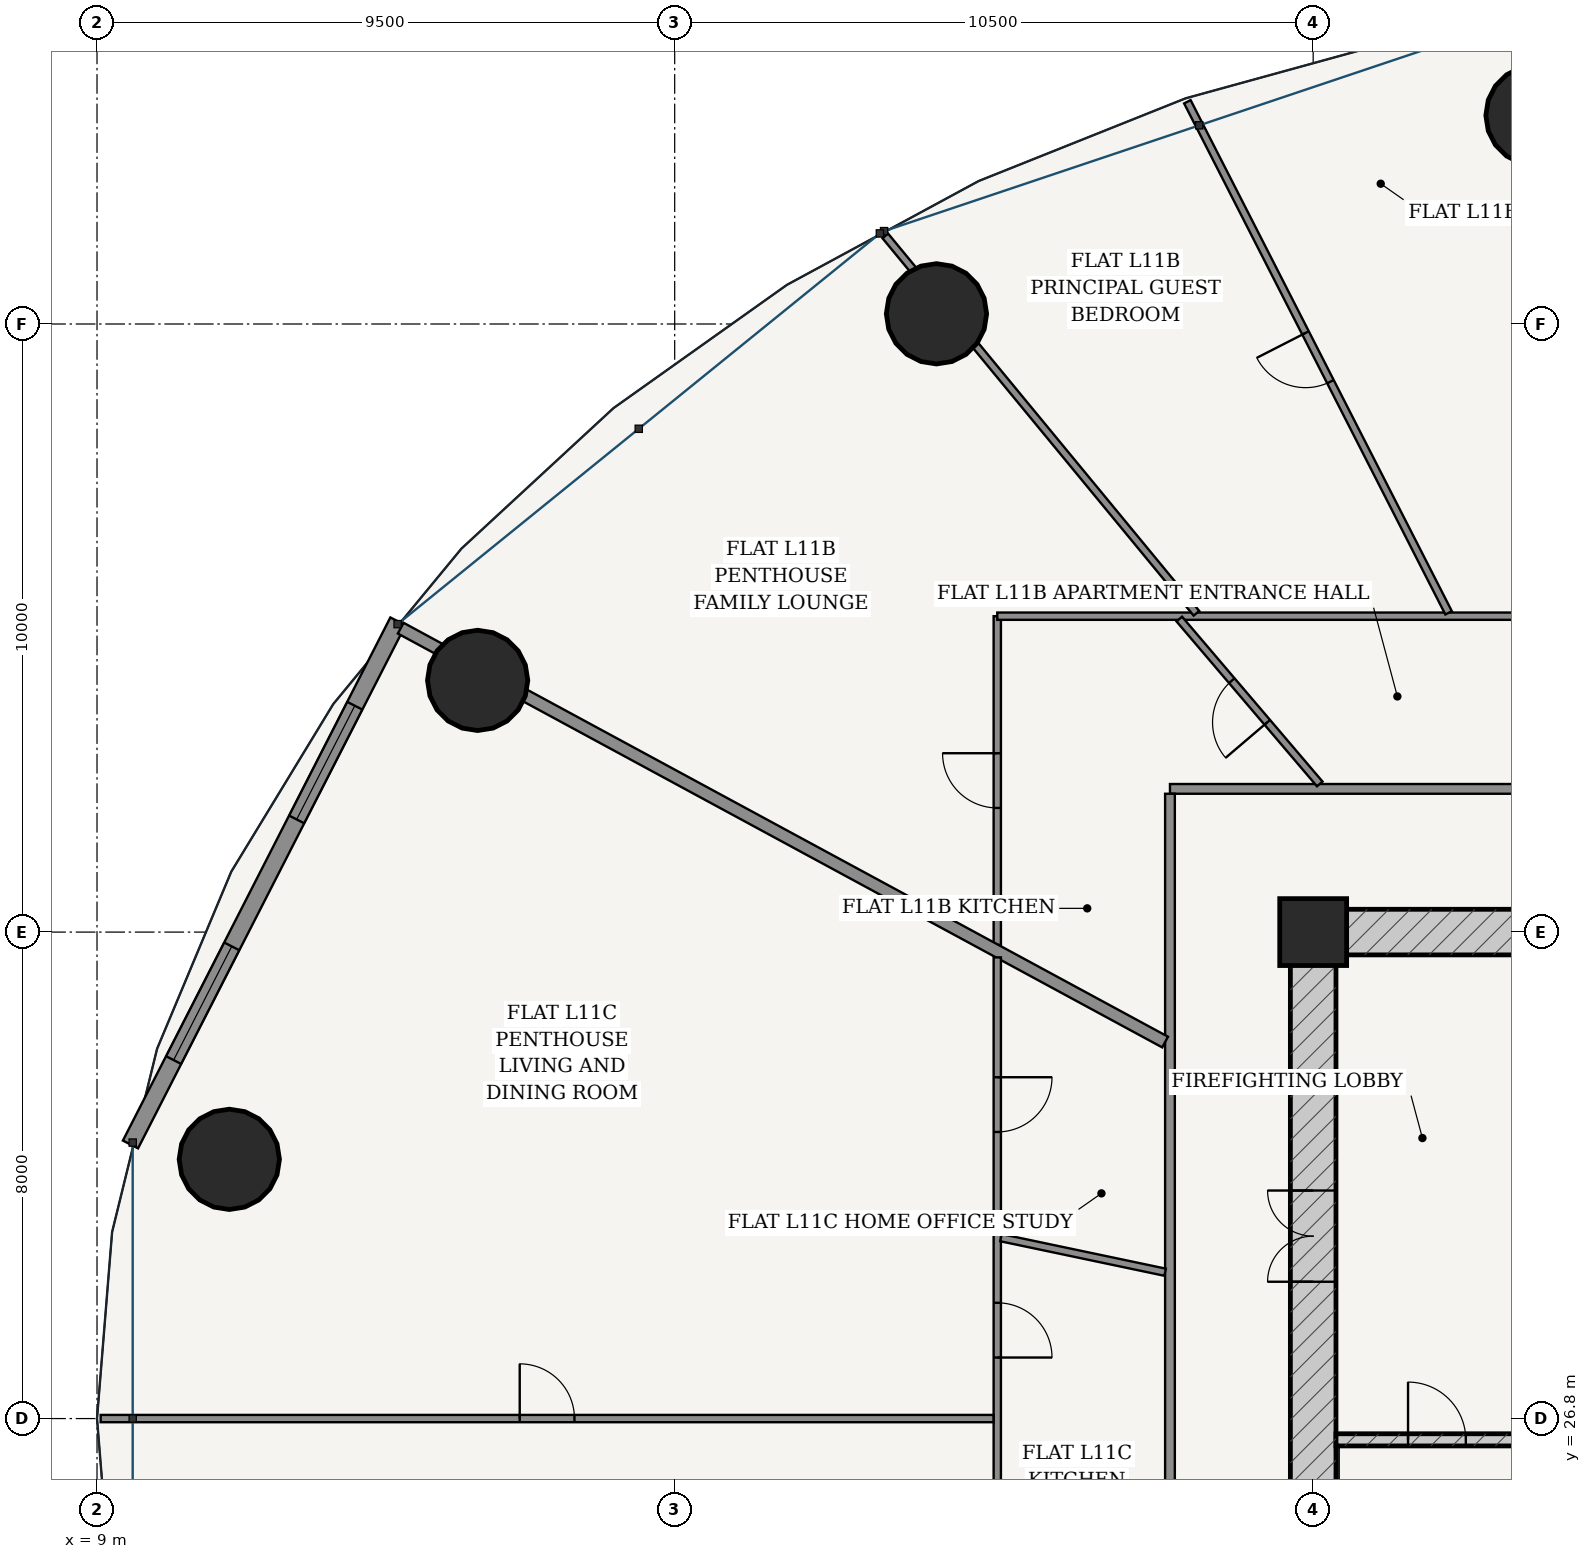
"""IFC4 building model, lengths in metres.
Left out: names, types, materials, properties, quantities, classifications, styles, units other than length and angle.
Written with IfcOpenShell. Run it as: python <this file> out.ifc"""

import sys

from ifc_helpers import new_model, si_unit, direction, frame, frame_2d, origin, origin_2d, place, context, subcontext, project, spatial, rectangle, hollow_circle, extrude, source, transform, mapped, element, fill, save


model = new_model("IFC4")
c1 = context("Model", 3, precision=1e-05, world=origin(), true_north=direction((-0.2419218956, 0.970295726276)))
c2 = subcontext(c1, "Body", "Model", "MODEL_VIEW")
j1 = project(units=[si_unit("LENGTHUNIT", "METRE"), si_unit("PLANEANGLEUNIT", "RADIAN")], contexts=[c1])
p1 = place(None, origin())
s1 = spatial("IfcSite", under=j1, at=p1, CompositionType="ELEMENT")
p2 = place(p1, origin())
s2 = spatial("IfcBuilding", under=s1, at=p2, CompositionType="ELEMENT")
p3 = place(p2, frame((0.0, 0.0, 45.6)))
s3 = spatial("IfcBuildingStorey", under=s2, at=p3, CompositionType="ELEMENT", Elevation=45.6)
p4 = place(p3, frame((29.0, 34.8, 0.0), z_axis=(0.0, 0.0, 1.0), x_axis=(1.0, 0.0, 0.0)))
e1 = element("IfcColumn", 1, at=p4, inside=s3, PredefinedType="COLUMN", context=c2, shape_type="SweptSolid", body=[
    extrude(rectangle(XDim=1.1, YDim=1.1, at=origin_2d()), origin(), (0.0, 0.0, 1.0), 3.6),
])
p5 = place(p3, frame((28.625, 34.8, 0.0), z_axis=(0.0, 0.0, 1.0), x_axis=(1.0, 0.0, 0.0)))
e2 = element("IfcWall", 2, at=p5, inside=s3, PredefinedType="SHEAR", context=c2, shape_type="SweptSolid", body=[
    extrude(rectangle(XDim=18.75, YDim=0.75, at=frame_2d((9.375, 0.0))), origin(), (0.0, 0.0, 1.0), 3.32),
])
p6 = place(p5, frame((6.887, 0.0, 0.0)))
e3 = element("IfcOpeningElement", 3, at=p6, cuts=e2, PredefinedType="OPENING", context=c2, shape_type="SweptSolid", body=[
    extrude(rectangle(XDim=0.85, YDim=2.1, at=frame_2d((0.425, 1.05))), frame((0.0, 0.385, 0.0), z_axis=(0.0, -1.0, 0.0), x_axis=(1.0, 0.0, 0.0)), (0.0, 0.0, 1.0), 0.77),
])
p7 = place(p5, frame((8.945, 0.0, 0.0)))
e4 = element("IfcOpeningElement", 4, at=p7, cuts=e2, PredefinedType="OPENING", context=c2, shape_type="SweptSolid", body=[
    extrude(rectangle(XDim=0.86, YDim=2.1, at=frame_2d((0.43, 1.05))), frame((0.0, 0.385, 0.0), z_axis=(0.0, -1.0, 0.0), x_axis=(1.0, 0.0, 0.0)), (0.0, 0.0, 1.0), 0.77),
])
p8 = place(p5, frame((11.012, 0.0, 0.0)))
e5 = element("IfcOpeningElement", 5, at=p8, cuts=e2, PredefinedType="OPENING", context=c2, shape_type="SweptSolid", body=[
    extrude(rectangle(XDim=0.85, YDim=2.1, at=frame_2d((0.425, 1.05))), frame((0.0, 0.385, 0.0), z_axis=(0.0, -1.0, 0.0), x_axis=(1.0, 0.0, 0.0)), (0.0, 0.0, 1.0), 0.77),
])
p9 = place(p3, frame((29.0, 19.175, 0.0), z_axis=(0.0, 0.0, 1.0), x_axis=(0.0, 1.0, 0.0)))
e6 = element("IfcWall", 6, at=p9, inside=s3, PredefinedType="SHEAR", context=c2, shape_type="SweptSolid", body=[
    extrude(rectangle(XDim=15.25, YDim=0.75, at=frame_2d((7.625, 0.0))), origin(), (0.0, 0.0, 1.0), 3.32),
])
p10 = place(p9, frame((9.875, 0.0, 0.0)))
e7 = element("IfcOpeningElement", 7, at=p10, cuts=e6, PredefinedType="OPENING", context=c2, shape_type="SweptSolid", body=[
    extrude(rectangle(XDim=1.5, YDim=2.2, at=frame_2d((0.75, 1.1))), frame((0.0, 0.385, 0.0), z_axis=(0.0, -1.0, 0.0), x_axis=(1.0, 0.0, 0.0)), (0.0, 0.0, 1.0), 0.77),
])
p11 = place(p3, frame((29.375, 26.45, 0.0), z_axis=(0.0, 0.0, 1.0), x_axis=(1.0, 0.0, 0.0)))
e8 = element("IfcWall", 8, at=p11, inside=s3, PredefinedType="SOLIDWALL", context=c2, shape_type="SweptSolid", body=[
    extrude(rectangle(XDim=3.32, YDim=0.2, at=frame_2d((1.66, 0.0))), origin(), (0.0, 0.0, 1.0), 3.32),
])
p12 = place(p11, frame((1.185, 0.0, 0.0)))
e9 = element("IfcOpeningElement", 9, at=p12, cuts=e8, PredefinedType="OPENING", context=c2, shape_type="SweptSolid", body=[
    extrude(rectangle(XDim=0.95, YDim=2.15, at=frame_2d((0.475, 1.075))), frame((0.0, 0.11, 0.0), z_axis=(0.0, -1.0, 0.0), x_axis=(1.0, 0.0, 0.0)), (0.0, 0.0, 1.0), 0.22),
])
for number, where, z_axis, x_axis in (
    (10, (32.664, 48.23, 0.0), (0.0, 0.0, 1.0), (1.0, 0.0, 0.0)),
    (11, (22.805, 44.968, 0.0), (0.0, 0.0, 1.0), (1.0, 0.0, 0.0)),
    (12, (15.259, 38.939, 0.0), (0.0, 0.0, 1.0), (1.0, 0.0, 0.0)),
    (13, (11.176, 31.063, 0.0), (0.0, 0.0, 1.0), (1.0, 0.0, 0.0)),
):
    element("IfcColumn", number, at=place(p3, frame(where, z_axis=z_axis, x_axis=x_axis)), inside=s3, PredefinedType="COLUMN", context=c2, shape_type="SweptSolid", body=[
        extrude(hollow_circle(Radius=0.825, WallThickness=0.05, at=origin_2d()), origin(), (0.0, 0.0, 1.0), 3.6),
    ])
p13 = place(p3, frame((13.949, 39.91, 0.0), z_axis=(0.0, 0.0, 1.0), x_axis=(-0.45523081716, -0.890373462715, 0.0)))
e14 = element("IfcWall", 14, at=p13, inside=s3, PredefinedType="SOLIDWALL", context=c2, shape_type="SweptSolid", body=[
    extrude(rectangle(XDim=9.662, YDim=0.28, at=frame_2d((4.831, 0.0))), origin(), (0.0, 0.0, 1.0), 3.32),
])
p14 = place(p13, frame((1.559, 0.0, 0.85)))
e15 = element("IfcOpeningElement", 15, at=p14, cuts=e14, PredefinedType="OPENING", context=c2, shape_type="SweptSolid", body=[
    extrude(rectangle(XDim=2.1, YDim=1.95, at=frame_2d((1.05, 0.975))), frame((0.0, 0.15, 0.0), z_axis=(0.0, -1.0, 0.0), x_axis=(1.0, 0.0, 0.0)), (0.0, 0.0, 1.0), 0.3),
])
p15 = place(p13, frame((6.003, 0.0, 0.85)))
e16 = element("IfcOpeningElement", 16, at=p15, cuts=e14, PredefinedType="OPENING", context=c2, shape_type="SweptSolid", body=[
    extrude(rectangle(XDim=2.1, YDim=1.95, at=frame_2d((1.05, 0.975))), frame((0.0, 0.15, 0.0), z_axis=(0.0, -1.0, 0.0), x_axis=(1.0, 0.0, 0.0)), (0.0, 0.0, 1.0), 0.3),
])
p16 = place(p3, frame((26.645, 37.155, 0.0), z_axis=(0.0, 0.0, 1.0), x_axis=(1.0, 0.0, 0.0)))
e17 = element("IfcWall", 17, at=p16, inside=s3, PredefinedType="PARTITIONING", context=c2, shape_type="SweptSolid", body=[
    extrude(rectangle(XDim=22.71, YDim=0.16, at=frame_2d((11.355, 0.0))), origin(), (0.0, 0.0, 1.0), 2.688),
])
p17 = place(p16, frame((19.075, 0.0, 0.0)))
e18 = element("IfcOpeningElement", 18, at=p17, cuts=e17, PredefinedType="OPENING", context=c2, shape_type="SweptSolid", body=[
    extrude(rectangle(XDim=0.98, YDim=2.2, at=frame_2d((0.49, 1.1))), frame((0.0, 0.09, 0.0), z_axis=(0.0, -1.0, 0.0), x_axis=(1.0, 0.0, 0.0)), (0.0, 0.0, 1.0), 0.18),
])
p18 = place(p16, frame((6.221, 0.0, 0.0)))
e19 = element("IfcOpeningElement", 19, at=p18, cuts=e17, PredefinedType="OPENING", context=c2, shape_type="SweptSolid", body=[
    extrude(rectangle(XDim=0.98, YDim=2.2, at=frame_2d((0.49, 1.1))), frame((0.0, 0.09, 0.0), z_axis=(0.0, -1.0, 0.0), x_axis=(1.0, 0.0, 0.0)), (0.0, 0.0, 1.0), 0.18),
])
p19 = place(p3, frame((26.645, 16.525, 0.0), z_axis=(0.0, 0.0, 1.0), x_axis=(0.0, 1.0, 0.0)))
e20 = element("IfcWall", 20, at=p19, inside=s3, PredefinedType="PARTITIONING", context=c2, shape_type="SweptSolid", body=[
    extrude(rectangle(XDim=20.55, YDim=0.16, at=frame_2d((10.275, 0.0))), origin(), (0.0, 0.0, 1.0), 2.688),
])
p20 = place(p19, frame((2.224, 0.0, 0.0)))
e21 = element("IfcOpeningElement", 21, at=p20, cuts=e20, PredefinedType="OPENING", context=c2, shape_type="SweptSolid", body=[
    extrude(rectangle(XDim=0.98, YDim=2.2, at=frame_2d((0.49, 1.1))), frame((0.0, 0.09, 0.0), z_axis=(0.0, -1.0, 0.0), x_axis=(1.0, 0.0, 0.0)), (0.0, 0.0, 1.0), 0.18),
])
p21 = place(p3, frame((23.805, 34.588, 0.0), z_axis=(0.0, 0.0, 1.0), x_axis=(0.0, 1.0, 0.0)))
e22 = element("IfcWall", 22, at=p21, inside=s3, PredefinedType="PARTITIONING", context=c2, shape_type="SweptSolid", body=[
    extrude(rectangle(XDim=5.407, YDim=0.12, at=frame_2d((2.704, 0.0))), origin(), (0.0, 0.0, 1.0), 2.999),
])
p22 = place(p21, frame((2.253, 0.0, 0.0)))
e23 = element("IfcOpeningElement", 23, at=p22, cuts=e22, PredefinedType="OPENING", context=c2, shape_type="SweptSolid", body=[
    extrude(rectangle(XDim=0.9, YDim=2.15, at=frame_2d((0.45, 1.075))), frame((0.0, 0.07, 0.0), z_axis=(0.0, -1.0, 0.0), x_axis=(1.0, 0.0, 0.0)), (0.0, 0.0, 1.0), 0.14),
])
p23 = place(p3, frame((23.805, 39.995, 0.0), z_axis=(0.0, 0.0, 1.0), x_axis=(1.0, 0.0, 0.0)))
e24 = element("IfcWall", 24, at=p23, inside=s3, PredefinedType="PARTITIONING", context=c2, shape_type="SweptSolid", body=[
    extrude(rectangle(XDim=20.838, YDim=0.12, at=frame_2d((10.419, 0.0))), origin(), (0.0, 0.0, 1.0), 2.688),
])
p24 = place(p23, frame((11.931, 0.0, 0.0)))
e25 = element("IfcOpeningElement", 25, at=p24, cuts=e24, PredefinedType="OPENING", context=c2, shape_type="SweptSolid", body=[
    extrude(rectangle(XDim=0.9, YDim=2.15, at=frame_2d((0.45, 1.075))), frame((0.0, 0.07, 0.0), z_axis=(0.0, -1.0, 0.0), x_axis=(1.0, 0.0, 0.0)), (0.0, 0.0, 1.0), 0.14),
])
p25 = place(p3, frame((31.227, 40.05, 0.0), z_axis=(0.0, 0.0, 1.0), x_axis=(-0.455142050367, 0.890418841887, 0.0)))
e26 = element("IfcWall", 26, at=p25, inside=s3, PredefinedType="PARTITIONING", context=c2, shape_type="SweptSolid", body=[
    extrude(rectangle(XDim=9.438, YDim=0.12, at=frame_2d((4.719, 0.0))), origin(), (0.0, 0.0, 1.0), 2.762),
])
p26 = place(p25, frame((4.269, 0.0, 0.0)))
e27 = element("IfcOpeningElement", 27, at=p26, cuts=e26, PredefinedType="OPENING", context=c2, shape_type="SweptSolid", body=[
    extrude(rectangle(XDim=0.9, YDim=2.15, at=frame_2d((0.45, 1.075))), frame((0.0, 0.07, 0.0), z_axis=(0.0, -1.0, 0.0), x_axis=(1.0, 0.0, 0.0)), (0.0, 0.0, 1.0), 0.14),
])
p27 = place(p3, frame((27.081, 40.043, 0.0), z_axis=(0.0, 0.0, 1.0), x_axis=(-0.636193310573, 0.771529695852, 0.0)))
e28 = element("IfcWall", 28, at=p27, inside=s3, PredefinedType="PARTITIONING", context=c2, shape_type="SweptSolid", body=[
    extrude(rectangle(XDim=8.044, YDim=0.12, at=frame_2d((4.022, 0.0))), origin(), (0.0, 0.0, 1.0), 2.688),
])
p28 = place(p3, frame((29.108, 37.237, 0.0), z_axis=(0.0, 0.0, 1.0), x_axis=(-0.648553247009, 0.761169288526, 0.0)))
e29 = element("IfcWall", 29, at=p28, inside=s3, PredefinedType="PARTITIONING", context=c2, shape_type="SweptSolid", body=[
    extrude(rectangle(XDim=3.562, YDim=0.12, at=frame_2d((1.781, 0.0))), origin(), (0.0, 0.0, 1.0), 2.999),
])
p29 = place(p28, frame((1.331, 0.0, 0.0)))
e30 = element("IfcOpeningElement", 30, at=p29, cuts=e29, PredefinedType="OPENING", context=c2, shape_type="SweptSolid", body=[
    extrude(rectangle(XDim=0.9, YDim=2.15, at=frame_2d((0.45, 1.075))), frame((0.0, 0.07, 0.0), z_axis=(0.0, -1.0, 0.0), x_axis=(1.0, 0.0, 0.0)), (0.0, 0.0, 1.0), 0.14),
])
p30 = place(p3, frame((26.565, 32.991, 0.0), z_axis=(0.0, 0.0, 1.0), x_axis=(-0.879369737803, 0.476139542819, 0.0)))
e31 = element("IfcWall", 31, at=p30, inside=s3, PredefinedType="PARTITIONING", context=c2, shape_type="SweptSolid", body=[
    extrude(rectangle(XDim=14.295, YDim=0.2, at=frame_2d((7.147, 0.0))), origin(), (0.0, 0.0, 1.0), 2.688),
])
p31 = place(p3, frame((23.805, 13.605, 0.0), z_axis=(0.0, 0.0, 1.0), x_axis=(0.0, 1.0, 0.0)))
e32 = element("IfcWall", 32, at=p31, inside=s3, PredefinedType="PARTITIONING", context=c2, shape_type="SweptSolid", body=[
    extrude(rectangle(XDim=20.779, YDim=0.12, at=frame_2d((10.39, 0.0))), origin(), (0.0, 0.0, 1.0), 2.688),
])
p32 = place(p31, frame((2.425, 0.0, 0.0)))
e33 = element("IfcOpeningElement", 33, at=p32, cuts=e32, PredefinedType="OPENING", context=c2, shape_type="SweptSolid", body=[
    extrude(rectangle(XDim=0.9, YDim=2.15, at=frame_2d((0.45, 1.075))), frame((0.0, 0.07, 0.0), z_axis=(0.0, -1.0, 0.0), x_axis=(1.0, 0.0, 0.0)), (0.0, 0.0, 1.0), 0.14),
])
p33 = place(p31, frame((14.199, 0.0, 0.0)))
e34 = element("IfcOpeningElement", 34, at=p33, cuts=e32, PredefinedType="OPENING", context=c2, shape_type="SweptSolid", body=[
    extrude(rectangle(XDim=0.9, YDim=2.15, at=frame_2d((0.45, 1.075))), frame((0.0, 0.07, 0.0), z_axis=(0.0, -1.0, 0.0), x_axis=(1.0, 0.0, 0.0)), (0.0, 0.0, 1.0), 0.14),
])
p34 = place(p31, frame((17.908, 0.0, 0.0)))
e35 = element("IfcOpeningElement", 35, at=p34, cuts=e32, PredefinedType="OPENING", context=c2, shape_type="SweptSolid", body=[
    extrude(rectangle(XDim=0.9, YDim=2.15, at=frame_2d((0.45, 1.075))), frame((0.0, 0.07, 0.0), z_axis=(0.0, -1.0, 0.0), x_axis=(1.0, 0.0, 0.0)), (0.0, 0.0, 1.0), 0.14),
])
p35 = place(p3, frame((23.743, 26.8, 0.0), z_axis=(0.0, 0.0, 1.0), x_axis=(-1.0, 0.0, 0.0)))
e36 = element("IfcWall", 36, at=p35, inside=s3, PredefinedType="PARTITIONING", context=c2, shape_type="SweptSolid", body=[
    extrude(rectangle(XDim=14.683, YDim=0.12, at=frame_2d((7.341, 0.0))), origin(), (0.0, 0.0, 1.0), 2.762),
])
p36 = place(p35, frame((6.892, 0.0, 0.0)))
e37 = element("IfcOpeningElement", 37, at=p36, cuts=e36, PredefinedType="OPENING", context=c2, shape_type="SweptSolid", body=[
    extrude(rectangle(XDim=0.9, YDim=2.15, at=frame_2d((0.45, 1.075))), frame((0.0, 0.07, 0.0), z_axis=(0.0, -1.0, 0.0), x_axis=(1.0, 0.0, 0.0)), (0.0, 0.0, 1.0), 0.14),
])
p37 = place(p3, frame((26.565, 29.207, 0.0), z_axis=(0.0, 0.0, 1.0), x_axis=(-0.978560113768, 0.205961413236, 0.0)))
e38 = element("IfcWall", 38, at=p37, inside=s3, PredefinedType="PARTITIONING", context=c2, shape_type="SweptSolid", body=[
    extrude(rectangle(XDim=2.758, YDim=0.12, at=frame_2d((1.379, 0.0))), origin(), (0.0, 0.0, 1.0), 3.32),
])
m1 = source(origin(), c2, "Body", "SweptSolid", [
    extrude(rectangle(XDim=2.1, YDim=1.95, at=frame_2d((1.05, 0.975))), frame((0.0, 0.03, 0.0), z_axis=(0.0, -1.0, 0.0), x_axis=(1.0, 0.0, 0.0)), (0.0, 0.0, 1.0), 0.06),
])
p38 = place(p14, origin())
e39 = element("IfcWindow", 39, at=p38, inside=s3, PartitioningType="SINGLE_PANEL", PredefinedType="WINDOW", context=c2, shape_type="MappedRepresentation", body=[
    mapped(m1, transform((0.0, 0.0, 0.0), scale=1.0)),
])
fill(e15, e39)
p39 = place(p15, origin())
e40 = element("IfcWindow", 40, at=p39, inside=s3, PartitioningType="SINGLE_PANEL", PredefinedType="WINDOW", context=c2, shape_type="MappedRepresentation", body=[
    mapped(m1, transform((0.0, 0.0, 0.0), scale=1.0)),
])
fill(e16, e40)
m2 = source(origin(), c2, "Body", "SweptSolid", [
    extrude(rectangle(XDim=1.5, YDim=2.2, at=frame_2d((0.75, 1.1))), frame((0.0, 0.025, 0.0), z_axis=(0.0, -1.0, 0.0), x_axis=(1.0, 0.0, 0.0)), (0.0, 0.0, 1.0), 0.05),
])
p40 = place(p10, origin())
e41 = element("IfcDoor", 41, at=p40, inside=s3, OperationType="DOUBLE_DOOR_SINGLE_SWING", PredefinedType="DOOR", context=c2, shape_type="MappedRepresentation", body=[
    mapped(m2, transform((0.0, 0.0, 0.0), scale=1.0)),
])
fill(e7, e41)
m3 = source(origin(), c2, "Body", "SweptSolid", [
    extrude(rectangle(XDim=0.95, YDim=2.15, at=frame_2d((0.475, 1.075))), frame((0.0, 0.025, 0.0), z_axis=(0.0, -1.0, 0.0), x_axis=(1.0, 0.0, 0.0)), (0.0, 0.0, 1.0), 0.05),
])
p41 = place(p12, origin())
e42 = element("IfcDoor", 42, at=p41, inside=s3, OperationType="SINGLE_SWING_LEFT", PredefinedType="DOOR", context=c2, shape_type="MappedRepresentation", body=[
    mapped(m3, transform((0.0, 0.0, 0.0), scale=1.0)),
])
fill(e9, e42)
m4 = source(origin(), c2, "Body", "SweptSolid", [
    extrude(rectangle(XDim=0.9, YDim=2.15, at=frame_2d((0.45, 1.075))), frame((0.0, 0.025, 0.0), z_axis=(0.0, -1.0, 0.0), x_axis=(1.0, 0.0, 0.0)), (0.0, 0.0, 1.0), 0.05),
])
p42 = place(p29, origin())
e43 = element("IfcDoor", 43, at=p42, inside=s3, OperationType="SINGLE_SWING_LEFT", PredefinedType="DOOR", context=c2, shape_type="MappedRepresentation", body=[
    mapped(m4, transform((0.0, 0.0, 0.0), scale=1.0)),
])
fill(e30, e43)
p43 = place(p22, origin())
e44 = element("IfcDoor", 44, at=p43, inside=s3, OperationType="SINGLE_SWING_RIGHT", PredefinedType="DOOR", context=c2, shape_type="MappedRepresentation", body=[
    mapped(m4, transform((0.0, 0.0, 0.0), scale=1.0)),
])
fill(e23, e44)
p44 = place(p26, origin())
e45 = element("IfcDoor", 45, at=p44, inside=s3, OperationType="SINGLE_SWING_RIGHT", PredefinedType="DOOR", context=c2, shape_type="MappedRepresentation", body=[
    mapped(m4, transform((0.0, 0.0, 0.0), scale=1.0)),
])
fill(e27, e45)
p45 = place(p36, frame((0.9, 0.0, 0.0), z_axis=(0.0, 0.0, 1.0), x_axis=(-1.0, 0.0, 0.0)))
e46 = element("IfcDoor", 46, at=p45, inside=s3, OperationType="SINGLE_SWING_LEFT", PredefinedType="DOOR", context=c2, shape_type="MappedRepresentation", body=[
    mapped(m4, transform((0.0, 0.0, 0.0), scale=1.0)),
])
fill(e37, e46)
p46 = place(p33, frame((0.9, 0.0, 0.0), z_axis=(0.0, 0.0, 1.0), x_axis=(-1.0, 0.0, 0.0)))
e47 = element("IfcDoor", 47, at=p46, inside=s3, OperationType="SINGLE_SWING_RIGHT", PredefinedType="DOOR", context=c2, shape_type="MappedRepresentation", body=[
    mapped(m4, transform((0.0, 0.0, 0.0), scale=1.0)),
])
fill(e34, e47)
p47 = place(p34, frame((0.9, 0.0, 0.0), z_axis=(0.0, 0.0, 1.0), x_axis=(-1.0, 0.0, 0.0)))
e48 = element("IfcDoor", 48, at=p47, inside=s3, OperationType="SINGLE_SWING_LEFT", PredefinedType="DOOR", context=c2, shape_type="MappedRepresentation", body=[
    mapped(m4, transform((0.0, 0.0, 0.0), scale=1.0)),
])
fill(e35, e48)
save(model, sys.argv[1])
